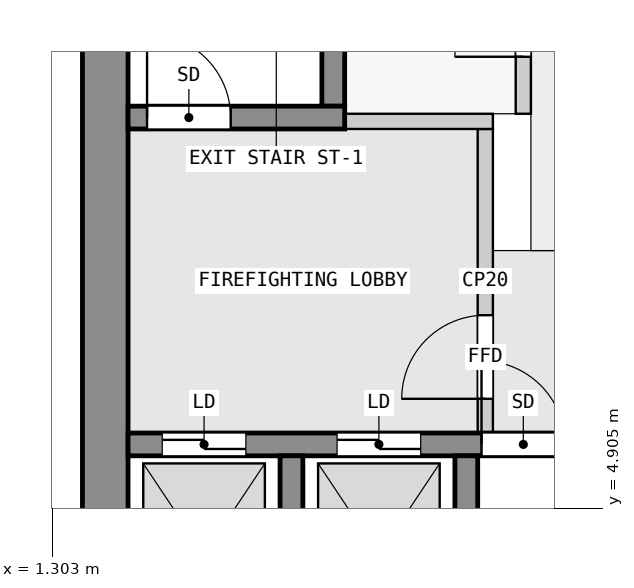
"""IFC4 building model, lengths in metres.
Left out: names, types, materials, properties, quantities, classifications, styles, units other than length and angle.
Written with IfcOpenShell. Run it as: python <this file> out.ifc"""

import sys

from ifc_helpers import new_model, si_unit, direction, frame, frame_2d, origin, place, context, subcontext, project, spatial, rectangle, extrude, element, fill, save


model = new_model("IFC4")
c1 = context("Model", 3, precision=1e-05, world=origin(), true_north=direction((0.0, 1.0)))
c2 = subcontext(c1, "Body", "Model", "MODEL_VIEW")
j1 = project(units=[si_unit("LENGTHUNIT", "METRE"), si_unit("PLANEANGLEUNIT", "RADIAN")], contexts=[c1])
p1 = place(None, origin())
s1 = spatial("IfcSite", under=j1, at=p1, CompositionType="ELEMENT")
p2 = place(p1, origin())
s2 = spatial("IfcBuilding", under=s1, at=p2, CompositionType="ELEMENT")
p3 = place(p2, frame((0.0, 0.0, 142.9)))
s3 = spatial("IfcBuildingStorey", under=s2, at=p3, CompositionType="ELEMENT", Elevation=142.9)
p4 = place(p3, frame((2.0, 2.5, 0.0), z_axis=(0.0, 0.0, 1.0), x_axis=(0.0, 1.0, 0.0)))
e1 = element("IfcWall", 1, at=p4, inside=s3, PredefinedType="SHEAR", context=c2, shape_type="SweptSolid", body=[
    extrude(rectangle(XDim=14.9, YDim=0.6, at=frame_2d((7.45, 0.0))), origin(), (0.0, 0.0, 1.0), 3.25),
])
for number, where, z_axis, x_axis in (
    (2, (4.45, 2.8, 0.0), (0.0, 0.0, 1.0), (0.0, 1.0, 0.0)),
    (3, (6.75, 2.8, 0.0), (0.0, 0.0, 1.0), (0.0, 1.0, 0.0)),
):
    element("IfcWall", number, at=place(p3, frame(where, z_axis=z_axis, x_axis=x_axis)), inside=s3, PredefinedType="SHEAR", context=c2, shape_type="SweptSolid", body=[
        extrude(rectangle(XDim=2.8, YDim=0.3, at=frame_2d((1.4, 0.0))), origin(), (0.0, 0.0, 1.0), 3.25),
    ])
p5 = place(p3, frame((2.3, 5.75, 0.0), z_axis=(0.0, 0.0, 1.0), x_axis=(1.0, 0.0, 0.0)))
e4 = element("IfcWall", 4, at=p5, inside=s3, PredefinedType="SHEAR", context=c2, shape_type="SweptSolid", body=[
    extrude(rectangle(XDim=18.8, YDim=0.3, at=frame_2d((9.4, 0.0))), origin(), (0.0, 0.0, 1.0), 3.25),
])
p6 = place(p5, frame((4.65, 0.0, 0.0)))
e5 = element("IfcOpeningElement", 5, at=p6, cuts=e4, PredefinedType="OPENING", context=c2, shape_type="SweptSolid", body=[
    extrude(rectangle(XDim=1.1, YDim=2.1, at=frame_2d((0.55, 1.05))), frame((0.0, 0.16, 0.0), z_axis=(0.0, -1.0, 0.0), x_axis=(1.0, 0.0, 0.0)), (0.0, 0.0, 1.0), 0.32),
])
p7 = place(p5, frame((0.45, 0.0, 0.0)))
e6 = element("IfcOpeningElement", 6, at=p7, cuts=e4, PredefinedType="OPENING", context=c2, shape_type="SweptSolid", body=[
    extrude(rectangle(XDim=1.1, YDim=2.1, at=frame_2d((0.55, 1.05))), frame((0.0, 0.16, 0.0), z_axis=(0.0, -1.0, 0.0), x_axis=(1.0, 0.0, 0.0)), (0.0, 0.0, 1.0), 0.32),
])
p8 = place(p5, frame((2.75, 0.0, 0.0)))
e7 = element("IfcOpeningElement", 7, at=p8, cuts=e4, PredefinedType="OPENING", context=c2, shape_type="SweptSolid", body=[
    extrude(rectangle(XDim=1.1, YDim=2.1, at=frame_2d((0.55, 1.05))), frame((0.0, 0.16, 0.0), z_axis=(0.0, -1.0, 0.0), x_axis=(1.0, 0.0, 0.0)), (0.0, 0.0, 1.0), 0.32),
])
p9 = place(p5, frame((13.2, 0.0, 0.0)))
e8 = element("IfcOpeningElement", 8, at=p9, cuts=e4, PredefinedType="OPENING", context=c2, shape_type="SweptSolid", body=[
    extrude(rectangle(XDim=0.9, YDim=2.1, at=frame_2d((0.45, 1.05))), frame((0.0, 0.16, 0.0), z_axis=(0.0, -1.0, 0.0), x_axis=(1.0, 0.0, 0.0)), (0.0, 0.0, 1.0), 0.32),
])
p10 = place(p5, frame((16.95, 0.0, 0.0)))
e9 = element("IfcOpeningElement", 9, at=p10, cuts=e4, PredefinedType="OPENING", context=c2, shape_type="SweptSolid", body=[
    extrude(rectangle(XDim=0.9, YDim=2.1, at=frame_2d((0.45, 1.05))), frame((0.0, 0.16, 0.0), z_axis=(0.0, -1.0, 0.0), x_axis=(1.0, 0.0, 0.0)), (0.0, 0.0, 1.0), 0.32),
])
p11 = place(p3, frame((2.3, 10.05, 0.0), z_axis=(0.0, 0.0, 1.0), x_axis=(1.0, 0.0, 0.0)))
e10 = element("IfcWall", 10, at=p11, inside=s3, PredefinedType="SHEAR", context=c2, shape_type="SweptSolid", body=[
    extrude(rectangle(XDim=2.85, YDim=0.3, at=frame_2d((1.425, 0.0))), origin(), (0.0, 0.0, 1.0), 3.25),
])
p12 = place(p11, frame((0.25, 0.0, 0.0)))
e11 = element("IfcOpeningElement", 11, at=p12, cuts=e10, PredefinedType="OPENING", context=c2, shape_type="SweptSolid", body=[
    extrude(rectangle(XDim=1.1, YDim=2.1, at=frame_2d((0.55, 1.05))), frame((0.0, 0.16, 0.0), z_axis=(0.0, -1.0, 0.0), x_axis=(1.0, 0.0, 0.0)), (0.0, 0.0, 1.0), 0.32),
])
p13 = place(p3, frame((5.0, 10.2, 0.0), z_axis=(0.0, 0.0, 1.0), x_axis=(0.0, 1.0, 0.0)))
e12 = element("IfcWall", 12, at=p13, inside=s3, PredefinedType="SHEAR", context=c2, shape_type="SweptSolid", body=[
    extrude(rectangle(XDim=6.4, YDim=0.3, at=frame_2d((3.2, 0.0))), origin(), (0.0, 0.0, 1.0), 3.25),
])
p14 = place(p3, frame((7.0, 5.9, 0.0), z_axis=(0.0, 0.0, 1.0), x_axis=(0.0, 1.0, 0.0)))
e13 = element("IfcWall", 13, at=p14, inside=s3, PredefinedType="PARTITIONING", context=c2, shape_type="SweptSolid", body=[
    extrude(rectangle(XDim=4.0, YDim=0.2, at=frame_2d((2.0, 0.0))), origin(), (0.0, 0.0, 1.0), 3.25),
])
p15 = place(p14, frame((0.45, 0.0, 0.0)))
e14 = element("IfcOpeningElement", 14, at=p15, cuts=e13, PredefinedType="OPENING", context=c2, shape_type="SweptSolid", body=[
    extrude(rectangle(XDim=1.1, YDim=2.1, at=frame_2d((0.55, 1.05))), frame((0.0, 0.11, 0.0), z_axis=(0.0, -1.0, 0.0), x_axis=(1.0, 0.0, 0.0)), (0.0, 0.0, 1.0), 0.22),
])
p16 = place(p3, frame((5.15, 10.0, 0.0), z_axis=(0.0, 0.0, 1.0), x_axis=(1.0, 0.0, 0.0)))
e15 = element("IfcWall", 15, at=p16, inside=s3, PredefinedType="PARTITIONING", context=c2, shape_type="SweptSolid", body=[
    extrude(rectangle(XDim=1.95, YDim=0.2, at=frame_2d((0.975, 0.0))), origin(), (0.0, 0.0, 1.0), 3.25),
])
p17 = place(p3, frame((7.5, 10.1, 0.0), z_axis=(0.0, 0.0, 1.0), x_axis=(0.0, 1.0, 0.0)))
e16 = element("IfcWall", 16, at=p17, inside=s3, PredefinedType="PARTITIONING", context=c2, shape_type="SweptSolid", body=[
    extrude(rectangle(XDim=7.3, YDim=0.2, at=frame_2d((3.65, 0.0))), origin(), (0.0, 0.0, 1.0), 3.25),
])
p18 = place(p17, frame((0.75, 0.0, 0.0)))
e17 = element("IfcOpeningElement", 17, at=p18, cuts=e16, PredefinedType="OPENING", context=c2, shape_type="SweptSolid", body=[
    extrude(rectangle(XDim=0.9, YDim=2.1, at=frame_2d((0.45, 1.05))), frame((0.0, 0.11, 0.0), z_axis=(0.0, -1.0, 0.0), x_axis=(1.0, 0.0, 0.0)), (0.0, 0.0, 1.0), 0.22),
])
p19 = place(p17, frame((4.4, 0.0, 0.0)))
e18 = element("IfcOpeningElement", 18, at=p19, cuts=e16, PredefinedType="OPENING", context=c2, shape_type="SweptSolid", body=[
    extrude(rectangle(XDim=0.9, YDim=2.1, at=frame_2d((0.45, 1.05))), frame((0.0, 0.11, 0.0), z_axis=(0.0, -1.0, 0.0), x_axis=(1.0, 0.0, 0.0)), (0.0, 0.0, 1.0), 0.22),
])
p20 = place(p15, origin())
e19 = element("IfcDoor", 19, at=p20, inside=s3, OperationType="SINGLE_SWING_LEFT", PredefinedType="DOOR", context=c2, shape_type="SweptSolid", body=[
    extrude(rectangle(XDim=1.1, YDim=2.1, at=frame_2d((0.55, 1.05))), frame((0.0, 0.025, 0.0), z_axis=(0.0, -1.0, 0.0), x_axis=(1.0, 0.0, 0.0)), (0.0, 0.0, 1.0), 0.05),
])
fill(e14, e19)
p21 = place(p12, origin())
e20 = element("IfcDoor", 20, at=p21, inside=s3, OperationType="SINGLE_SWING_RIGHT", PredefinedType="DOOR", context=c2, shape_type="SweptSolid", body=[
    extrude(rectangle(XDim=1.1, YDim=2.1, at=frame_2d((0.55, 1.05))), frame((0.0, 0.025, 0.0), z_axis=(0.0, -1.0, 0.0), x_axis=(1.0, 0.0, 0.0)), (0.0, 0.0, 1.0), 0.05),
])
fill(e11, e20)
p22 = place(p6, origin())
e21 = element("IfcDoor", 21, at=p22, inside=s3, OperationType="SINGLE_SWING_LEFT", PredefinedType="DOOR", context=c2, shape_type="SweptSolid", body=[
    extrude(rectangle(XDim=1.1, YDim=2.1, at=frame_2d((0.55, 1.05))), frame((0.0, 0.025, 0.0), z_axis=(0.0, -1.0, 0.0), x_axis=(1.0, 0.0, 0.0)), (0.0, 0.0, 1.0), 0.05),
])
fill(e5, e21)
p23 = place(p7, origin())
e22 = element("IfcDoor", 22, at=p23, inside=s3, OperationType="DOUBLE_DOOR_SLIDING", PredefinedType="DOOR", context=c2, shape_type="SweptSolid", body=[
    extrude(rectangle(XDim=1.1, YDim=2.1, at=frame_2d((0.55, 1.05))), frame((0.0, 0.025, 0.0), z_axis=(0.0, -1.0, 0.0), x_axis=(1.0, 0.0, 0.0)), (0.0, 0.0, 1.0), 0.05),
])
fill(e6, e22)
p24 = place(p8, origin())
e23 = element("IfcDoor", 23, at=p24, inside=s3, OperationType="DOUBLE_DOOR_SLIDING", PredefinedType="DOOR", context=c2, shape_type="SweptSolid", body=[
    extrude(rectangle(XDim=1.1, YDim=2.1, at=frame_2d((0.55, 1.05))), frame((0.0, 0.025, 0.0), z_axis=(0.0, -1.0, 0.0), x_axis=(1.0, 0.0, 0.0)), (0.0, 0.0, 1.0), 0.05),
])
fill(e7, e23)
p25 = place(p18, origin())
e24 = element("IfcDoor", 24, at=p25, inside=s3, OperationType="SINGLE_SWING_RIGHT", PredefinedType="DOOR", context=c2, shape_type="SweptSolid", body=[
    extrude(rectangle(XDim=0.9, YDim=2.1, at=frame_2d((0.45, 1.05))), frame((0.0, 0.025, 0.0), z_axis=(0.0, -1.0, 0.0), x_axis=(1.0, 0.0, 0.0)), (0.0, 0.0, 1.0), 0.05),
])
fill(e17, e24)
save(model, sys.argv[1])
